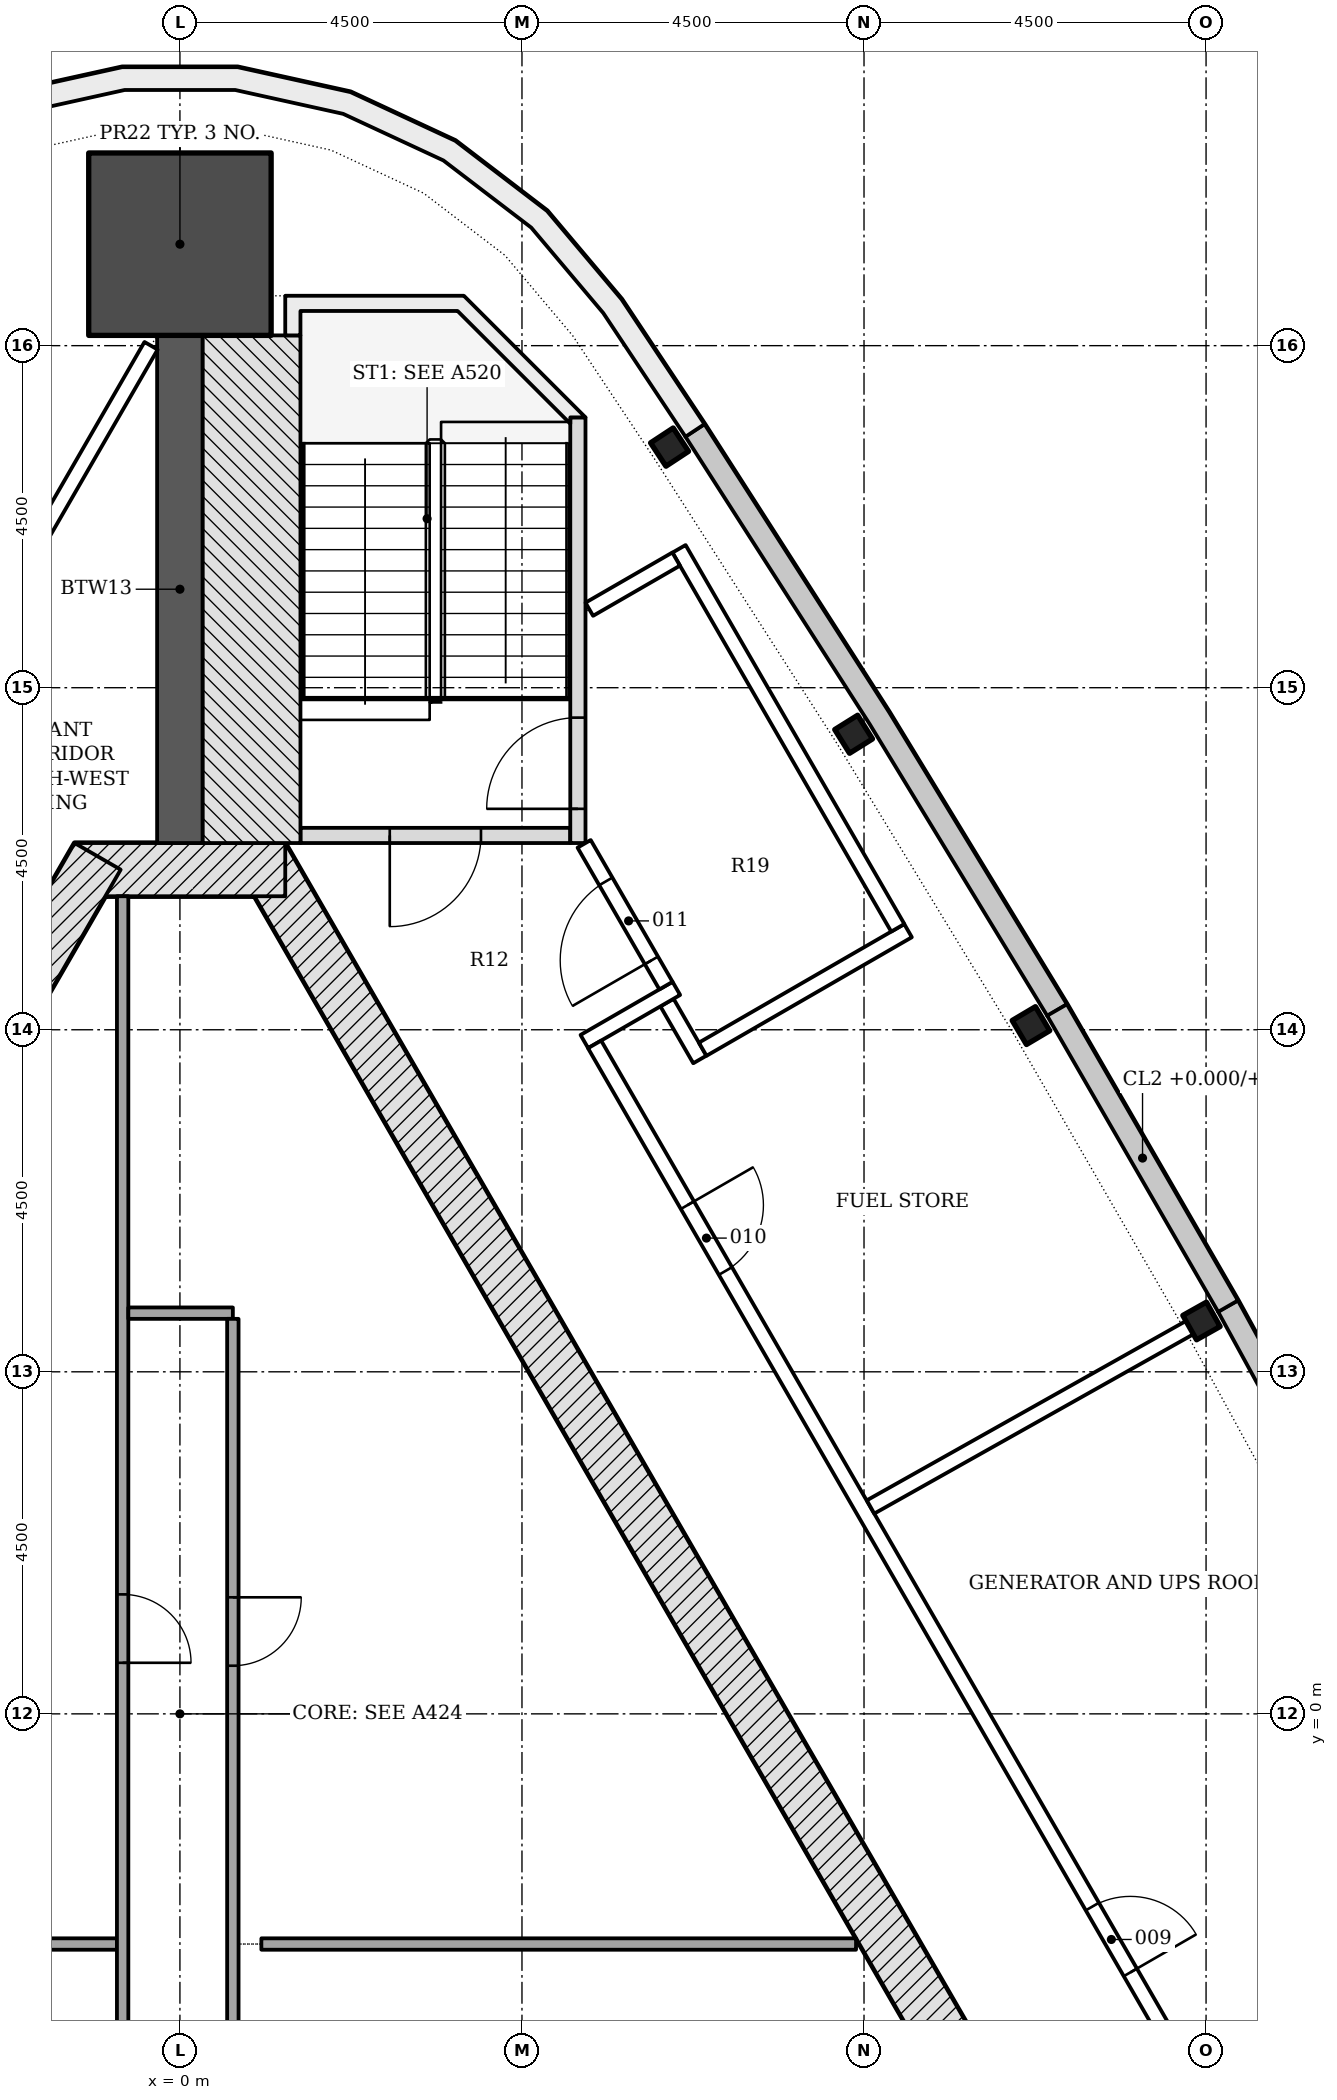
"""IFC4 building model, lengths in metres.
Left out: names, types, materials, properties, quantities, classifications, styles, units other than length and angle.
Written with IfcOpenShell. Run it as: python <this file> out.ifc"""

import sys

from ifc_helpers import new_model, si_unit, direction, frame, frame_2d, origin, origin_2d, place, context, subcontext, project, spatial, polyline, rectangle, i_section, outline, extrude, element, fill, save


model = new_model("IFC4")
c1 = context("Model", 3, precision=1e-05, world=origin(), true_north=direction((0.0, 1.0)))
c2 = subcontext(c1, "Body", "Model", "MODEL_VIEW")
j1 = project(units=[si_unit("LENGTHUNIT", "METRE"), si_unit("PLANEANGLEUNIT", "RADIAN")], contexts=[c1])
p1 = place(None, origin())
s1 = spatial("IfcSite", under=j1, at=p1, CompositionType="ELEMENT")
p2 = place(p1, origin())
s2 = spatial("IfcBuilding", under=s1, at=p2, CompositionType="ELEMENT")
p3 = place(p2, frame((0.0, 0.0, 284.1)))
s3 = spatial("IfcBuildingStorey", under=s2, at=p3, CompositionType="ELEMENT", Elevation=284.1)
p4 = place(p3, frame((10.311, -4.703, -0.25), z_axis=(0.0, 0.0, 1.0), x_axis=(-0.500001446645, 0.866024568562, 0.0)))
e1 = element("IfcWall", 1, at=p4, inside=s3, PredefinedType="SHEAR", context=c2, shape_type="SweptSolid", body=[
    extrude(rectangle(XDim=18.458, YDim=0.7, at=frame_2d((9.229, 0.0))), origin(), (0.0, 0.0, 1.0), 4.5),
])
p5 = place(p3, frame((1.386, 11.106, -0.25), z_axis=(0.0, 0.0, 1.0), x_axis=(-1.0, 0.0, 0.0)))
e2 = element("IfcWall", 2, at=p5, inside=s3, PredefinedType="SHEAR", context=c2, shape_type="SweptSolid", body=[
    extrude(rectangle(XDim=2.771, YDim=0.7, at=frame_2d((1.386, 0.0))), origin(), (0.0, 0.0, 1.0), 4.5),
])
p6 = place(p3, frame((-1.083, 11.281, -0.25), z_axis=(0.0, 0.0, 1.0), x_axis=(-0.500001446645, -0.866024568562, 0.0)))
e3 = element("IfcWall", 3, at=p6, inside=s3, PredefinedType="SHEAR", context=c2, shape_type="SweptSolid", body=[
    extrude(rectangle(XDim=18.458, YDim=0.7, at=frame_2d((9.229, 0.0))), origin(), (0.0, 0.0, 1.0), 4.5),
])
p7 = place(p6, frame((8.979, 0.0, 0.25)))
e4 = element("IfcOpeningElement", 4, at=p7, cuts=e3, PredefinedType="OPENING", context=c2, shape_type="SweptSolid", body=[
    extrude(rectangle(XDim=1.2, YDim=2.1, at=frame_2d((0.6, 1.05))), frame((0.0, 0.36, 0.0), z_axis=(0.0, -1.0, 0.0), x_axis=(1.0, 0.0, 0.0)), (0.0, 0.0, 1.0), 0.72),
])
p8 = place(p6, frame((11.029, 0.0, 0.25)))
e5 = element("IfcOpeningElement", 5, at=p8, cuts=e3, PredefinedType="OPENING", context=c2, shape_type="SweptSolid", body=[
    extrude(rectangle(XDim=1.2, YDim=2.1, at=frame_2d((0.6, 1.05))), frame((0.0, 0.36, 0.0), z_axis=(0.0, -1.0, 0.0), x_axis=(1.0, 0.0, 0.0)), (0.0, 0.0, 1.0), 0.72),
])
p9 = place(p3, frame((0.0, 11.456, -0.25), z_axis=(0.0, 0.0, 1.0), x_axis=(0.0, 1.0, 0.0)))
e6 = element("IfcWall", 6, at=p9, inside=s3, PredefinedType="SHEAR", context=c2, shape_type="SweptSolid", body=[
    extrude(rectangle(XDim=6.679, YDim=0.6, at=frame_2d((3.339, 0.0))), origin(), (0.0, 0.0, 1.0), 4.5),
])
p10 = place(p3, frame((0.0, 19.335, -0.25), z_axis=(0.0, 0.0, 1.0), x_axis=(0.0, 1.0, 0.0)))
e7 = element("IfcColumn", 7, at=p10, inside=s3, PredefinedType="COLUMN", context=c2, shape_type="SweptSolid", body=[
    extrude(rectangle(XDim=2.4, YDim=2.4, at=origin_2d()), origin(), (0.0, 0.0, 1.0), 4.5),
])
for number, where, z_axis, x_axis in (
    (8, (13.44, 5.169, -0.25), (0.0, 0.0, 1.0), (-0.49, 0.872, 0.0)),
    (9, (11.196, 9.055, -0.25), (0.0, 0.0, 1.0), (-0.51, 0.86, 0.0)),
    (10, (8.863, 12.888, -0.25), (0.0, 0.0, 1.0), (-0.53, 0.848, 0.0)),
    (11, (6.442, 16.666, -0.25), (0.0, 0.0, 1.0), (-0.549, 0.836, 0.0)),
):
    element("IfcColumn", number, at=place(p3, frame(where, z_axis=z_axis, x_axis=x_axis)), inside=s3, PredefinedType="COLUMN", context=c2, shape_type="SweptSolid", body=[
        extrude(i_section(OverallWidth=0.368, OverallDepth=0.356, WebThickness=0.011, FlangeThickness=0.018, FilletRadius=0.015, at=origin_2d()), origin(), (0.0, 0.0, 1.0), 4.5),
    ])
p11 = place(p3, origin())
e12 = element("IfcWall", 12, at=p11, inside=s3, PredefinedType="NOTDEFINED", context=c2, shape_type="SweptSolid", body=[
    extrude(outline(polyline([(18.145, -2.507), (16.078, 1.49), (13.919, 5.438), (13.656, 5.294), (15.813, 1.349), (17.878, -2.645), (18.145, -2.507)])), origin(), (0.0, 0.0, 1.0), 4.25),
])
p12 = place(p3, origin())
e13 = element("IfcWall", 13, at=p12, inside=s3, PredefinedType="NOTDEFINED", context=c2, shape_type="SweptSolid", body=[
    extrude(outline(polyline([(11.669, 9.335), (9.33, 13.179), (6.901, 16.968), (6.649, 16.806), (9.075, 13.02), (11.413, 9.179), (11.669, 9.335)])), origin(), (0.0, 0.0, 1.0), 4.25),
])
p13 = place(p3, origin())
e14 = element("IfcWall", 14, at=p13, inside=s3, PredefinedType="NOTDEFINED", context=c2, shape_type="SweptSolid", body=[
    extrude(outline(polyline([(13.919, 5.438), (11.669, 9.335), (11.409, 9.185), (13.659, 5.288), (13.919, 5.438)])), origin(), (0.0, 0.0, 1.0), 1.2),
])
p14 = place(p3, origin())
e15 = element("IfcWall", 15, at=p14, inside=s3, PredefinedType="NOTDEFINED", context=c2, shape_type="SweptSolid", body=[
    extrude(outline(polyline([(11.244, -14.46), (13.211, -14.336), (14.708, -14.069), (16.111, -13.485), (17.355, -12.611), (18.381, -11.49), (19.141, -10.174), (19.599, -8.724), (19.733, -7.21), (19.538, -5.703), (19.021, -4.273), (18.145, -2.507), (17.876, -2.64), (18.745, -4.391), (19.244, -5.774), (19.432, -7.216), (19.303, -8.665), (18.865, -10.052), (18.138, -11.312), (17.156, -12.385), (15.965, -13.22), (14.623, -13.779), (13.176, -14.038), (11.225, -14.161), (11.244, -14.46)])), origin(), (0.0, 0.0, 1.0), 4.25),
])
p15 = place(p3, origin())
e16 = element("IfcWall", 16, at=p15, inside=s3, PredefinedType="NOTDEFINED", context=c2, shape_type="SweptSolid", body=[
    extrude(outline(polyline([(6.901, 16.968), (5.81, 18.61), (4.83, 19.771), (3.623, 20.695), (2.244, 21.335), (0.76, 21.664), (-0.76, 21.664), (-2.244, 21.335), (-3.623, 20.695), (-4.83, 19.771), (-5.81, 18.61), (-6.901, 16.968), (-6.651, 16.802), (-5.569, 18.429), (-4.622, 19.553), (-3.466, 20.437), (-2.147, 21.05), (-0.727, 21.364), (0.727, 21.364), (2.147, 21.05), (3.466, 20.437), (4.622, 19.553), (5.569, 18.429), (6.651, 16.802), (6.901, 16.968)])), origin(), (0.0, 0.0, 1.0), 4.25),
])
p16 = place(p3, frame((-8.895, -3.028, 0.0), z_axis=(0.0, 0.0, 1.0), x_axis=(1.0, 0.0, 0.0)))
e17 = element("IfcWall", 17, at=p16, inside=s3, PredefinedType="PARTITIONING", context=c2, shape_type="SweptSolid", body=[
    extrude(rectangle(XDim=8.066, YDim=0.15, at=frame_2d((4.033, 0.0))), origin(), (0.0, 0.0, 1.0), 4.25),
])
p17 = place(p3, frame((-0.754, 10.756, 0.0), z_axis=(0.0, 0.0, 1.0), x_axis=(0.0, -1.0, 0.0)))
e18 = element("IfcWall", 18, at=p17, inside=s3, PredefinedType="PARTITIONING", context=c2, shape_type="SweptSolid", body=[
    extrude(rectangle(XDim=16.985, YDim=0.15, at=frame_2d((8.492, 0.0))), origin(), (0.0, 0.0, 1.0), 4.25),
])
p18 = place(p17, frame((9.185, 0.0, 0.0)))
e19 = element("IfcOpeningElement", 19, at=p18, cuts=e18, PredefinedType="OPENING", context=c2, shape_type="SweptSolid", body=[
    extrude(rectangle(XDim=0.9, YDim=2.1, at=frame_2d((0.45, 1.05))), frame((0.0, 0.085, 0.0), z_axis=(0.0, -1.0, 0.0), x_axis=(1.0, 0.0, 0.0)), (0.0, 0.0, 1.0), 0.17),
])
p19 = place(p3, frame((-0.679, 5.272, 0.0), z_axis=(0.0, 0.0, 1.0), x_axis=(1.0, 0.0, 0.0)))
e20 = element("IfcWall", 20, at=p19, inside=s3, PredefinedType="PARTITIONING", context=c2, shape_type="SweptSolid", body=[
    extrude(rectangle(XDim=1.375, YDim=0.15, at=frame_2d((0.688, 0.0))), origin(), (0.0, 0.0, 1.0), 4.25),
])
p20 = place(p3, frame((0.696, 5.197, 0.0), z_axis=(0.0, 0.0, 1.0), x_axis=(0.0, -1.0, 0.0)))
e21 = element("IfcWall", 21, at=p20, inside=s3, PredefinedType="PARTITIONING", context=c2, shape_type="SweptSolid", body=[
    extrude(rectangle(XDim=11.425, YDim=0.15, at=frame_2d((5.712, 0.0))), origin(), (0.0, 0.0, 1.0), 4.25),
])
p21 = place(p20, frame((3.664, 0.0, 0.0)))
e22 = element("IfcOpeningElement", 22, at=p21, cuts=e21, PredefinedType="OPENING", context=c2, shape_type="SweptSolid", body=[
    extrude(rectangle(XDim=0.9, YDim=2.1, at=frame_2d((0.45, 1.05))), frame((0.0, 0.085, 0.0), z_axis=(0.0, -1.0, 0.0), x_axis=(1.0, 0.0, 0.0)), (0.0, 0.0, 1.0), 0.17),
])
p22 = place(p3, frame((1.071, -3.028, 0.0), z_axis=(0.0, 0.0, 1.0), x_axis=(1.0, 0.0, 0.0)))
e23 = element("IfcWall", 23, at=p22, inside=s3, PredefinedType="PARTITIONING", context=c2, shape_type="SweptSolid", body=[
    extrude(rectangle(XDim=7.824, YDim=0.15, at=frame_2d((3.912, 0.0))), origin(), (0.0, 0.0, 1.0), 4.25),
])
p23 = place(p3, frame((5.135, 11.556, -0.25), z_axis=(0.0, 0.0, 1.0), x_axis=(-1.0, 0.0, 0.0)))
e24 = element("IfcWall", 24, at=p23, inside=s3, PredefinedType="SHEAR", context=c2, shape_type="SweptSolid", body=[
    extrude(rectangle(XDim=3.55, YDim=0.2, at=frame_2d((1.775, 0.0))), origin(), (0.0, 0.0, 1.0), 4.5),
])
p24 = place(p23, frame((1.175, 0.0, 0.25)))
e25 = element("IfcOpeningElement", 25, at=p24, cuts=e24, PredefinedType="OPENING", context=c2, shape_type="SweptSolid", body=[
    extrude(rectangle(XDim=1.2, YDim=2.1, at=frame_2d((0.6, 1.05))), frame((0.0, 0.11, 0.0), z_axis=(0.0, -1.0, 0.0), x_axis=(1.0, 0.0, 0.0)), (0.0, 0.0, 1.0), 0.22),
])
p25 = place(p3, frame((5.236, 11.456, -0.25), z_axis=(0.0, 0.0, 1.0), x_axis=(0.0, 1.0, 0.0)))
e26 = element("IfcWall", 26, at=p25, inside=s3, PredefinedType="SHEAR", context=c2, shape_type="SweptSolid", body=[
    extrude(rectangle(XDim=5.6, YDim=0.2, at=frame_2d((2.8, 0.0))), origin(), (0.0, 0.0, 1.0), 4.5),
])
p26 = place(p25, frame((0.45, 0.0, 0.25)))
e27 = element("IfcOpeningElement", 27, at=p26, cuts=e26, PredefinedType="OPENING", context=c2, shape_type="SweptSolid", body=[
    extrude(rectangle(XDim=1.2, YDim=2.1, at=frame_2d((0.6, 1.05))), frame((0.0, 0.11, 0.0), z_axis=(0.0, -1.0, 0.0), x_axis=(1.0, 0.0, 0.0)), (0.0, 0.0, 1.0), 0.22),
])
p27 = place(p3, frame((0.943, 11.456, -0.25), z_axis=(0.0, 0.0, 1.0), x_axis=(0.0, 1.0, 0.0)))
e28 = element("IfcWall", 28, at=p27, inside=s3, PredefinedType="SHEAR", context=c2, shape_type="SweptSolid", body=[
    extrude(rectangle(XDim=6.679, YDim=1.286, at=frame_2d((3.339, 0.0))), origin(), (0.0, 0.0, 1.0), 4.5),
])
p28 = place(p3, frame((0.0, 0.0, -0.25)))
e29 = element("IfcWall", 29, at=p28, inside=s3, PredefinedType="SHEAR", context=c2, shape_type="SweptSolid", body=[
    extrude(outline(polyline([(5.336, 17.056), (3.736, 18.656), (1.385, 18.656), (1.385, 18.135), (1.586, 18.135), (1.586, 18.456), (3.653, 18.456), (5.135, 16.974), (5.135, 17.056), (5.135, 17.056), (5.135, 17.056), (5.135, 17.056), (5.135, 17.056), (5.135, 17.056), (5.135, 17.056), (5.135, 17.056), (5.135, 17.056), (5.135, 17.056), (5.135, 17.056), (5.135, 17.056), (5.135, 17.056), (5.135, 17.056), (5.135, 17.056), (5.135, 17.056), (5.135, 17.056), (5.336, 17.056)])), origin(), (0.0, 0.0, 1.0), 4.5),
])
p29 = place(p3, frame((-7.654, 5.4, 0.0), z_axis=(0.0, 0.0, 1.0), x_axis=(0.500007192329, 0.866021251252, 0.0)))
e30 = element("IfcWall", 30, at=p29, inside=s3, PredefinedType="PARTITIONING", context=c2, shape_type="SweptSolid", body=[
    extrude(rectangle(XDim=14.547, YDim=0.2, at=frame_2d((7.273, 0.0))), origin(), (0.0, 0.0, 1.0), 3.702),
])
p30 = place(p29, frame((9.709, 0.0, 0.0)))
e31 = element("IfcOpeningElement", 31, at=p30, cuts=e30, PredefinedType="OPENING", context=c2, shape_type="SweptSolid", body=[
    extrude(rectangle(XDim=1.0, YDim=2.1, at=frame_2d((0.5, 1.05))), frame((0.0, 0.11, 0.0), z_axis=(0.0, -1.0, 0.0), x_axis=(1.0, 0.0, 0.0)), (0.0, 0.0, 1.0), 0.22),
])
p31 = place(p29, frame((2.306, 0.0, 0.0)))
e32 = element("IfcOpeningElement", 32, at=p31, cuts=e30, PredefinedType="OPENING", context=c2, shape_type="SweptSolid", body=[
    extrude(rectangle(XDim=1.0, YDim=2.1, at=frame_2d((0.5, 1.05))), frame((0.0, 0.11, 0.0), z_axis=(0.0, -1.0, 0.0), x_axis=(1.0, 0.0, 0.0)), (0.0, 0.0, 1.0), 0.22),
])
p32 = place(p3, frame((6.408, 9.358, 0.0), z_axis=(0.0, 0.0, 1.0), x_axis=(0.49996696679, -0.866044474677, 0.0)))
e33 = element("IfcWall", 33, at=p32, inside=s3, PredefinedType="PARTITIONING", context=c2, shape_type="SweptSolid", body=[
    extrude(rectangle(XDim=0.864, YDim=0.2, at=frame_2d((0.432, 0.0))), origin(), (0.0, 0.0, 1.0), 4.25),
])
p33 = place(p3, frame((5.32, 8.845, 0.0), z_axis=(0.0, 0.0, 1.0), x_axis=(0.866031452229, 0.49998952364, 0.0)))
e34 = element("IfcWall", 34, at=p33, inside=s3, PredefinedType="PARTITIONING", context=c2, shape_type="SweptSolid", body=[
    extrude(rectangle(XDim=1.398, YDim=0.2, at=frame_2d((0.699, 0.0))), origin(), (0.0, 0.0, 1.0), 4.25),
])
p34 = place(p3, frame((6.395, 9.581, 0.0), z_axis=(0.0, 0.0, 1.0), x_axis=(-0.500003735859, 0.866023246874, 0.0)))
e35 = element("IfcWall", 35, at=p34, inside=s3, PredefinedType="PARTITIONING", context=c2, shape_type="SweptSolid", body=[
    extrude(rectangle(XDim=2.154, YDim=0.2, at=frame_2d((1.077, 0.0))), origin(), (0.0, 0.0, 1.0), 3.702),
])
p35 = place(p34, frame((0.383, 0.0, 0.0)))
e36 = element("IfcOpeningElement", 36, at=p35, cuts=e35, PredefinedType="OPENING", context=c2, shape_type="SweptSolid", body=[
    extrude(rectangle(XDim=1.2, YDim=2.1, at=frame_2d((0.6, 1.05))), frame((0.0, 0.11, 0.0), z_axis=(0.0, -1.0, 0.0), x_axis=(1.0, 0.0, 0.0)), (0.0, 0.0, 1.0), 0.22),
])
p36 = place(p3, frame((5.455, 8.808, 0.0), z_axis=(0.0, 0.0, 1.0), x_axis=(0.499996641012, -0.866027343088, 0.0)))
e37 = element("IfcWall", 37, at=p36, inside=s3, PredefinedType="PARTITIONING", context=c2, shape_type="SweptSolid", body=[
    extrude(rectangle(XDim=19.937, YDim=0.2, at=frame_2d((9.969, 0.0))), origin(), (0.0, 0.0, 1.0), 3.702),
])
p37 = place(p36, frame((13.097, 0.0, 0.0)))
e38 = element("IfcOpeningElement", 38, at=p37, cuts=e37, PredefinedType="OPENING", context=c2, shape_type="SweptSolid", body=[
    extrude(rectangle(XDim=1.0, YDim=2.1, at=frame_2d((0.5, 1.05))), frame((0.0, 0.11, 0.0), z_axis=(0.0, -1.0, 0.0), x_axis=(1.0, 0.0, 0.0)), (0.0, 0.0, 1.0), 0.22),
])
p38 = place(p36, frame((2.443, 0.0, 0.0)))
e39 = element("IfcOpeningElement", 39, at=p38, cuts=e37, PredefinedType="OPENING", context=c2, shape_type="SweptSolid", body=[
    extrude(rectangle(XDim=1.0, YDim=2.1, at=frame_2d((0.5, 1.05))), frame((0.0, 0.11, 0.0), z_axis=(0.0, -1.0, 0.0), x_axis=(1.0, 0.0, 0.0)), (0.0, 0.0, 1.0), 0.22),
])
p39 = place(p3, frame((9.086, 2.722, 0.0), z_axis=(0.0, 0.0, 1.0), x_axis=(0.87175044705, 0.489950158759, 0.0)))
e40 = element("IfcWall", 40, at=p39, inside=s3, PredefinedType="PARTITIONING", context=c2, shape_type="SweptSolid", body=[
    extrude(rectangle(XDim=4.844, YDim=0.2, at=frame_2d((2.422, 0.0))), origin(), (0.0, 0.0, 1.0), 3.702),
])
p40 = place(p3, frame((6.878, 8.744, 0.0), z_axis=(0.0, 0.0, 1.0), x_axis=(0.866023983177, 0.500002460556, 0.0)))
e41 = element("IfcWall", 41, at=p40, inside=s3, PredefinedType="PARTITIONING", context=c2, shape_type="SweptSolid", body=[
    extrude(rectangle(XDim=3.12, YDim=0.2, at=frame_2d((1.56, 0.0))), origin(), (0.0, 0.0, 1.0), 4.25),
])
p41 = place(p3, frame((6.566, 15.327, 0.0), z_axis=(0.0, 0.0, 1.0), x_axis=(0.499997778408, -0.866026686418, 0.0)))
e42 = element("IfcWall", 42, at=p41, inside=s3, PredefinedType="PARTITIONING", context=c2, shape_type="SweptSolid", body=[
    extrude(rectangle(XDim=5.757, YDim=0.2, at=frame_2d((2.878, 0.0))), origin(), (0.0, 0.0, 1.0), 3.702),
])
p42 = place(p3, frame((6.529, 15.192, 0.0), z_axis=(0.0, 0.0, 1.0), x_axis=(-0.866117824122, -0.499839889103, 0.0)))
e43 = element("IfcWall", 43, at=p42, inside=s3, PredefinedType="PARTITIONING", context=c2, shape_type="SweptSolid", body=[
    extrude(rectangle(XDim=1.32, YDim=0.2, at=frame_2d((0.66, 0.0))), origin(), (0.0, 0.0, 1.0), 4.25),
])
p43 = place(p18, origin())
e44 = element("IfcDoor", 44, at=p43, inside=s3, OperationType="SINGLE_SWING_RIGHT", PredefinedType="DOOR", context=c2, shape_type="SweptSolid", body=[
    extrude(rectangle(XDim=0.9, YDim=2.1, at=frame_2d((0.45, 1.05))), frame((0.0, 0.025, 0.0), z_axis=(0.0, -1.0, 0.0), x_axis=(1.0, 0.0, 0.0)), (0.0, 0.0, 1.0), 0.05),
])
fill(e19, e44)
p44 = place(p21, origin())
e45 = element("IfcDoor", 45, at=p44, inside=s3, OperationType="SINGLE_SWING_LEFT", PredefinedType="DOOR", context=c2, shape_type="SweptSolid", body=[
    extrude(rectangle(XDim=0.9, YDim=2.1, at=frame_2d((0.45, 1.05))), frame((0.0, 0.025, 0.0), z_axis=(0.0, -1.0, 0.0), x_axis=(1.0, 0.0, 0.0)), (0.0, 0.0, 1.0), 0.05),
])
fill(e22, e45)
p45 = place(p24, origin())
e46 = element("IfcDoor", 46, at=p45, inside=s3, OperationType="SINGLE_SWING_RIGHT", PredefinedType="DOOR", context=c2, shape_type="SweptSolid", body=[
    extrude(rectangle(XDim=1.2, YDim=2.1, at=frame_2d((0.6, 1.05))), frame((0.0, 0.025, 0.0), z_axis=(0.0, -1.0, 0.0), x_axis=(1.0, 0.0, 0.0)), (0.0, 0.0, 1.0), 0.05),
])
fill(e25, e46)
p46 = place(p26, origin())
e47 = element("IfcDoor", 47, at=p46, inside=s3, OperationType="SINGLE_SWING_LEFT", PredefinedType="DOOR", context=c2, shape_type="SweptSolid", body=[
    extrude(rectangle(XDim=1.2, YDim=2.1, at=frame_2d((0.6, 1.05))), frame((0.0, 0.025, 0.0), z_axis=(0.0, -1.0, 0.0), x_axis=(1.0, 0.0, 0.0)), (0.0, 0.0, 1.0), 0.05),
])
fill(e27, e47)
p47 = place(p37, origin())
e48 = element("IfcDoor", 48, at=p47, inside=s3, OperationType="SINGLE_SWING_RIGHT", PredefinedType="DOOR", context=c2, shape_type="SweptSolid", body=[
    extrude(rectangle(XDim=1.0, YDim=2.1, at=frame_2d((0.5, 1.05))), frame((0.0, 0.025, 0.0), z_axis=(0.0, -1.0, 0.0), x_axis=(1.0, 0.0, 0.0)), (0.0, 0.0, 1.0), 0.05),
])
fill(e38, e48)
p48 = place(p38, origin())
e49 = element("IfcDoor", 49, at=p48, inside=s3, OperationType="SINGLE_SWING_LEFT", PredefinedType="DOOR", context=c2, shape_type="SweptSolid", body=[
    extrude(rectangle(XDim=1.0, YDim=2.1, at=frame_2d((0.5, 1.05))), frame((0.0, 0.025, 0.0), z_axis=(0.0, -1.0, 0.0), x_axis=(1.0, 0.0, 0.0)), (0.0, 0.0, 1.0), 0.05),
])
fill(e39, e49)
p49 = place(p35, origin())
e50 = element("IfcDoor", 50, at=p49, inside=s3, OperationType="SINGLE_SWING_LEFT", PredefinedType="DOOR", context=c2, shape_type="SweptSolid", body=[
    extrude(rectangle(XDim=1.2, YDim=2.1, at=frame_2d((0.6, 1.05))), frame((0.0, 0.025, 0.0), z_axis=(0.0, -1.0, 0.0), x_axis=(1.0, 0.0, 0.0)), (0.0, 0.0, 1.0), 0.05),
])
fill(e36, e50)
save(model, sys.argv[1])
